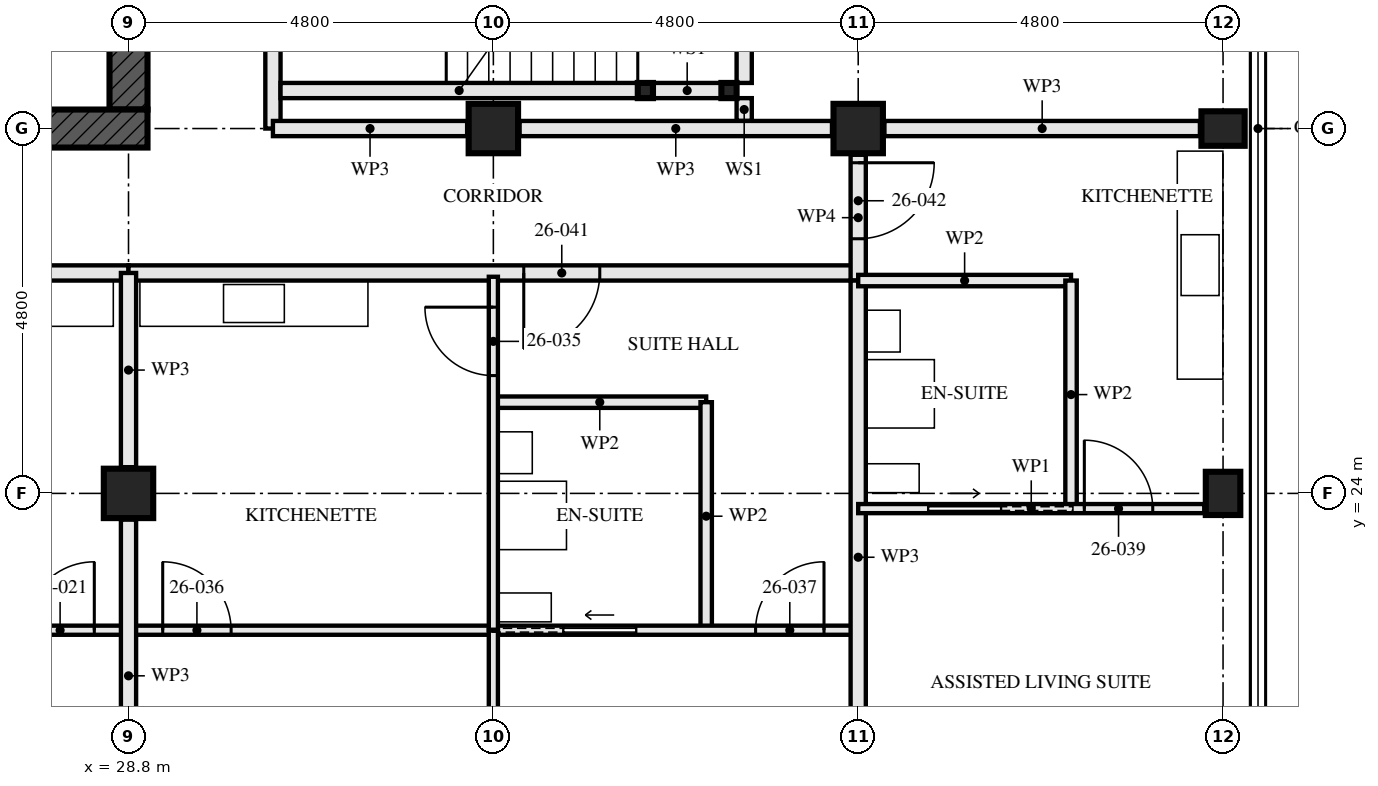
"""IFC4 building model, lengths in metres.
Left out: names, types, materials, properties, quantities, classifications, styles, units other than length and angle.
Written with IfcOpenShell. Run it as: python <this file> out.ifc"""

import sys

from ifc_helpers import new_model, si_unit, direction, frame, frame_2d, origin, origin_2d, place, context, subcontext, project, spatial, rectangle, hollow_rectangle, i_section, extrude, element, fill, save


model = new_model("IFC4")
c1 = context("Model", 3, precision=1e-05, world=origin(), true_north=direction((0.0, 1.0)))
c2 = subcontext(c1, "Body", "Model", "MODEL_VIEW")
j1 = project(units=[si_unit("LENGTHUNIT", "METRE"), si_unit("PLANEANGLEUNIT", "RADIAN")], contexts=[c1])
p1 = place(None, origin())
s1 = spatial("IfcSite", under=j1, at=p1, CompositionType="ELEMENT")
p2 = place(p1, origin())
s2 = spatial("IfcBuilding", under=s1, at=p2, CompositionType="ELEMENT")
p3 = place(p2, frame((0.0, 0.0, 98.0)))
s3 = spatial("IfcBuildingStorey", under=s2, at=p3, CompositionType="ELEMENT", Elevation=98.0)
for number, where, z_axis, x_axis in (
    (1, (28.8, 24.0, 0.0), (0.0, 0.0, 1.0), (1.0, 0.0, 0.0)),
    (2, (33.6, 28.8, 0.0), (0.0, 0.0, 1.0), (0.0, 1.0, 0.0)),
    (3, (38.4, 28.8, 0.0), (0.0, 0.0, 1.0), (0.0, 1.0, 0.0)),
):
    element("IfcColumn", number, at=place(p3, frame(where, z_axis=z_axis, x_axis=x_axis)), inside=s3, PredefinedType="COLUMN", context=c2, shape_type="SweptSolid", body=[
        extrude(hollow_rectangle(XDim=0.65, YDim=0.65, WallThickness=0.05, at=origin_2d()), origin(), (0.0, 0.0, 1.0), 3.5),
    ])
for number, where, z_axis, x_axis in (
    (4, (43.2, 24.0, 0.0), (0.0, 0.0, 1.0), (1.0, 0.0, 0.0)),
    (5, (43.2, 28.8, 0.0), (0.0, 0.0, 1.0), (0.0, 1.0, 0.0)),
):
    element("IfcColumn", number, at=place(p3, frame(where, z_axis=z_axis, x_axis=x_axis)), inside=s3, PredefinedType="COLUMN", context=c2, shape_type="SweptSolid", body=[
        extrude(i_section(OverallWidth=0.454, OverallDepth=0.569, WebThickness=0.078, FlangeThickness=0.125, FilletRadius=0.015, at=origin_2d()), origin(), (0.0, 0.0, 1.0), 3.5),
    ])
p4 = place(p3, frame((14.15, 28.8, -0.17), z_axis=(0.0, 0.0, 1.0), x_axis=(1.0, 0.0, 0.0)))
e6 = element("IfcWall", 6, at=p4, inside=s3, PredefinedType="SHEAR", context=c2, shape_type="SweptSolid", body=[
    extrude(rectangle(XDim=14.9, YDim=0.5, at=frame_2d((7.45, 0.0))), origin(), (0.0, 0.0, 1.0), 3.5),
])
p5 = place(p4, frame((6.85, 0.0, 0.17)))
e7 = element("IfcOpeningElement", 7, at=p5, cuts=e6, PredefinedType="OPENING", context=c2, shape_type="SweptSolid", body=[
    extrude(rectangle(XDim=1.2, YDim=2.1, at=frame_2d((0.6, 1.05))), frame((0.0, 0.26, 0.0), z_axis=(0.0, -1.0, 0.0), x_axis=(1.0, 0.0, 0.0)), (0.0, 0.0, 1.0), 0.521),
])
p6 = place(p3, frame((28.8, 29.05, -0.17), z_axis=(0.0, 0.0, 1.0), x_axis=(0.0, 1.0, 0.0)))
e8 = element("IfcWall", 8, at=p6, inside=s3, PredefinedType="SHEAR", context=c2, shape_type="SweptSolid", body=[
    extrude(rectangle(XDim=13.9, YDim=0.5, at=frame_2d((6.95, 0.0))), origin(), (0.0, 0.0, 1.0), 3.5),
])
p7 = place(p6, frame((6.35, 0.0, 0.17)))
e9 = element("IfcOpeningElement", 9, at=p7, cuts=e8, PredefinedType="OPENING", context=c2, shape_type="SweptSolid", body=[
    extrude(rectangle(XDim=1.2, YDim=2.1, at=frame_2d((0.6, 1.05))), frame((0.0, 0.26, 0.0), z_axis=(0.0, -1.0, 0.0), x_axis=(1.0, 0.0, 0.0)), (0.0, 0.0, 1.0), 0.521),
])
for number, where, z_axis, x_axis in (
    (10, (36.7, 29.3, 0.0), (0.0, 0.0, 1.0), (1.0, 0.0, 0.0)),
    (11, (35.6, 29.3, 0.0), (0.0, 0.0, 1.0), (1.0, 0.0, 0.0)),
):
    element("IfcColumn", number, at=place(p3, frame(where, z_axis=z_axis, x_axis=x_axis)), inside=s3, PredefinedType="COLUMN", context=c2, shape_type="SweptSolid", body=[
        extrude(hollow_rectangle(XDim=0.2, YDim=0.2, WallThickness=0.008, at=origin_2d()), origin(), (0.0, 0.0, 1.0), 3.33),
    ])
p8 = place(p3, frame((24.0, 22.2, 0.0), z_axis=(0.0, 0.0, 1.0), x_axis=(1.0, 0.0, 0.0)))
e12 = element("IfcWall", 12, at=p8, inside=s3, PredefinedType="PARTITIONING", context=c2, shape_type="SweptSolid", body=[
    extrude(rectangle(XDim=4.8, YDim=0.12, at=frame_2d((2.4, 0.0))), origin(), (0.0, 0.0, 1.0), 3.33),
])
p9 = place(p8, frame((3.45, 0.0, 0.0)))
e13 = element("IfcOpeningElement", 13, at=p9, cuts=e12, PredefinedType="OPENING", context=c2, shape_type="SweptSolid", body=[
    extrude(rectangle(XDim=0.9, YDim=2.1, at=frame_2d((0.45, 1.05))), frame((0.0, 0.071, 0.0), z_axis=(0.0, -1.0, 0.0), x_axis=(1.0, 0.0, 0.0)), (0.0, 0.0, 1.0), 0.141),
])
p10 = place(p8, frame((0.925, 0.0, 0.0)))
e14 = element("IfcOpeningElement", 14, at=p10, cuts=e12, PredefinedType="OPENING", context=c2, shape_type="SweptSolid", body=[
    extrude(rectangle(XDim=0.95, YDim=2.1, at=frame_2d((0.475, 1.05))), frame((0.0, 0.071, 0.0), z_axis=(0.0, -1.0, 0.0), x_axis=(1.0, 0.0, 0.0)), (0.0, 0.0, 1.0), 0.141),
])
p11 = place(p3, frame((13.96, 26.9, 0.0), z_axis=(0.0, 0.0, 1.0), x_axis=(1.0, 0.0, 0.0)))
e15 = element("IfcWall", 15, at=p11, inside=s3, PredefinedType="PARTITIONING", context=c2, shape_type="SweptSolid", body=[
    extrude(rectangle(XDim=14.84, YDim=0.2, at=frame_2d((7.42, 0.0))), origin(), (0.0, 0.0, 1.0), 2.32),
])
p12 = place(p11, frame((1.84, 0.0, 0.0)))
e16 = element("IfcOpeningElement", 16, at=p12, cuts=e15, PredefinedType="OPENING", context=c2, shape_type="SweptSolid", body=[
    extrude(rectangle(XDim=1.0, YDim=2.1, at=frame_2d((0.5, 1.05))), frame((0.0, 0.111, 0.0), z_axis=(0.0, -1.0, 0.0), x_axis=(1.0, 0.0, 0.0)), (0.0, 0.0, 1.0), 0.221),
])
p13 = place(p11, frame((3.94, 0.0, 0.0)))
e17 = element("IfcOpeningElement", 17, at=p13, cuts=e15, PredefinedType="OPENING", context=c2, shape_type="SweptSolid", body=[
    extrude(rectangle(XDim=1.0, YDim=2.1, at=frame_2d((0.5, 1.05))), frame((0.0, 0.111, 0.0), z_axis=(0.0, -1.0, 0.0), x_axis=(1.0, 0.0, 0.0)), (0.0, 0.0, 1.0), 0.221),
])
p14 = place(p11, frame((10.44, 0.0, 0.0)))
e18 = element("IfcOpeningElement", 18, at=p14, cuts=e15, PredefinedType="OPENING", context=c2, shape_type="SweptSolid", body=[
    extrude(rectangle(XDim=1.0, YDim=2.1, at=frame_2d((0.5, 1.05))), frame((0.0, 0.111, 0.0), z_axis=(0.0, -1.0, 0.0), x_axis=(1.0, 0.0, 0.0)), (0.0, 0.0, 1.0), 0.221),
])
p15 = place(p3, frame((36.4, 22.2, 0.0), z_axis=(0.0, 0.0, 1.0), x_axis=(0.0, 1.0, 0.0)))
e19 = element("IfcWall", 19, at=p15, inside=s3, PredefinedType="PARTITIONING", context=c2, shape_type="SweptSolid", body=[
    extrude(rectangle(XDim=3.0, YDim=0.15, at=frame_2d((1.5, 0.0))), origin(), (0.0, 0.0, 1.0), 2.55),
])
p16 = place(p3, frame((33.6, 25.2, 0.0), z_axis=(0.0, 0.0, 1.0), x_axis=(1.0, 0.0, 0.0)))
e20 = element("IfcWall", 20, at=p16, inside=s3, PredefinedType="PARTITIONING", context=c2, shape_type="SweptSolid", body=[
    extrude(rectangle(XDim=2.8, YDim=0.15, at=frame_2d((1.4, 0.0))), origin(), (0.0, 0.0, 1.0), 3.33),
])
p17 = place(p3, frame((33.6, 22.2, 0.0), z_axis=(0.0, 0.0, 1.0), x_axis=(0.0, 1.0, 0.0)))
e21 = element("IfcWall", 21, at=p17, inside=s3, PredefinedType="PARTITIONING", context=c2, shape_type="SweptSolid", body=[
    extrude(rectangle(XDim=4.65, YDim=0.12, at=frame_2d((2.325, 0.0))), origin(), (0.0, 0.0, 1.0), 2.55),
])
p18 = place(p17, frame((3.35, 0.0, 0.0)))
e22 = element("IfcOpeningElement", 22, at=p18, cuts=e21, PredefinedType="OPENING", context=c2, shape_type="SweptSolid", body=[
    extrude(rectangle(XDim=0.9, YDim=2.1, at=frame_2d((0.45, 1.05))), frame((0.0, 0.071, 0.0), z_axis=(0.0, -1.0, 0.0), x_axis=(1.0, 0.0, 0.0)), (0.0, 0.0, 1.0), 0.141),
])
p19 = place(p3, frame((28.8, 22.2, 0.0), z_axis=(0.0, 0.0, 1.0), x_axis=(1.0, 0.0, 0.0)))
e23 = element("IfcWall", 23, at=p19, inside=s3, PredefinedType="PARTITIONING", context=c2, shape_type="SweptSolid", body=[
    extrude(rectangle(XDim=4.8, YDim=0.12, at=frame_2d((2.4, 0.0))), origin(), (0.0, 0.0, 1.0), 3.33),
])
p20 = place(p19, frame((0.45, 0.0, 0.0)))
e24 = element("IfcOpeningElement", 24, at=p20, cuts=e23, PredefinedType="OPENING", context=c2, shape_type="SweptSolid", body=[
    extrude(rectangle(XDim=0.9, YDim=2.1, at=frame_2d((0.45, 1.05))), frame((0.0, 0.071, 0.0), z_axis=(0.0, -1.0, 0.0), x_axis=(1.0, 0.0, 0.0)), (0.0, 0.0, 1.0), 0.141),
])
p21 = place(p3, frame((33.6, 22.2, 0.0), z_axis=(0.0, 0.0, 1.0), x_axis=(1.0, 0.0, 0.0)))
e25 = element("IfcWall", 25, at=p21, inside=s3, PredefinedType="PARTITIONING", context=c2, shape_type="SweptSolid", body=[
    extrude(rectangle(XDim=4.8, YDim=0.12, at=frame_2d((2.4, 0.0))), origin(), (0.0, 0.0, 1.0), 3.33),
])
p22 = place(p21, frame((3.45, 0.0, 0.0)))
e26 = element("IfcOpeningElement", 26, at=p22, cuts=e25, PredefinedType="OPENING", context=c2, shape_type="SweptSolid", body=[
    extrude(rectangle(XDim=0.9, YDim=2.1, at=frame_2d((0.45, 1.05))), frame((0.0, 0.071, 0.0), z_axis=(0.0, -1.0, 0.0), x_axis=(1.0, 0.0, 0.0)), (0.0, 0.0, 1.0), 0.141),
])
p23 = place(p21, frame((0.925, 0.0, 0.0)))
e27 = element("IfcOpeningElement", 27, at=p23, cuts=e25, PredefinedType="OPENING", context=c2, shape_type="SweptSolid", body=[
    extrude(rectangle(XDim=0.95, YDim=2.1, at=frame_2d((0.475, 1.05))), frame((0.0, 0.071, 0.0), z_axis=(0.0, -1.0, 0.0), x_axis=(1.0, 0.0, 0.0)), (0.0, 0.0, 1.0), 0.141),
])
p24 = place(p3, frame((33.6, 14.647, 0.0), z_axis=(0.0, 0.0, 1.0), x_axis=(0.0, 1.0, 0.0)))
e28 = element("IfcWall", 28, at=p24, inside=s3, PredefinedType="PARTITIONING", context=c2, shape_type="SweptSolid", body=[
    extrude(rectangle(XDim=7.553, YDim=0.12, at=frame_2d((3.776, 0.0))), origin(), (0.0, 0.0, 1.0), 2.55),
])
p25 = place(p3, frame((38.4, 19.52, 0.0), z_axis=(0.0, 0.0, 1.0), x_axis=(0.0, 1.0, 0.0)))
e29 = element("IfcWall", 29, at=p25, inside=s3, PredefinedType="PARTITIONING", context=c2, shape_type="SweptSolid", body=[
    extrude(rectangle(XDim=7.28, YDim=0.2, at=frame_2d((3.64, 0.0))), origin(), (0.0, 0.0, 1.0), 2.55),
])
p26 = place(p3, frame((41.2, 23.8, 0.0), z_axis=(0.0, 0.0, 1.0), x_axis=(0.0, 1.0, 0.0)))
e30 = element("IfcWall", 30, at=p26, inside=s3, PredefinedType="PARTITIONING", context=c2, shape_type="SweptSolid", body=[
    extrude(rectangle(XDim=3.0, YDim=0.15, at=frame_2d((1.5, 0.0))), origin(), (0.0, 0.0, 1.0), 2.55),
])
p27 = place(p3, frame((38.4, 26.8, 0.0), z_axis=(0.0, 0.0, 1.0), x_axis=(1.0, 0.0, 0.0)))
e31 = element("IfcWall", 31, at=p27, inside=s3, PredefinedType="PARTITIONING", context=c2, shape_type="SweptSolid", body=[
    extrude(rectangle(XDim=2.8, YDim=0.15, at=frame_2d((1.4, 0.0))), origin(), (0.0, 0.0, 1.0), 3.33),
])
p28 = place(p3, frame((38.4, 23.8, 0.0), z_axis=(0.0, 0.0, 1.0), x_axis=(1.0, 0.0, 0.0)))
e32 = element("IfcWall", 32, at=p28, inside=s3, PredefinedType="PARTITIONING", context=c2, shape_type="SweptSolid", body=[
    extrude(rectangle(XDim=4.553, YDim=0.12, at=frame_2d((2.276, 0.0))), origin(), (0.0, 0.0, 1.0), 3.33),
])
p29 = place(p28, frame((2.975, 0.0, 0.0)))
e33 = element("IfcOpeningElement", 33, at=p29, cuts=e32, PredefinedType="OPENING", context=c2, shape_type="SweptSolid", body=[
    extrude(rectangle(XDim=0.9, YDim=2.1, at=frame_2d((0.45, 1.05))), frame((0.0, 0.071, 0.0), z_axis=(0.0, -1.0, 0.0), x_axis=(1.0, 0.0, 0.0)), (0.0, 0.0, 1.0), 0.141),
])
p30 = place(p28, frame((0.925, 0.0, 0.0)))
e34 = element("IfcOpeningElement", 34, at=p30, cuts=e32, PredefinedType="OPENING", context=c2, shape_type="SweptSolid", body=[
    extrude(rectangle(XDim=0.95, YDim=2.1, at=frame_2d((0.475, 1.05))), frame((0.0, 0.071, 0.0), z_axis=(0.0, -1.0, 0.0), x_axis=(1.0, 0.0, 0.0)), (0.0, 0.0, 1.0), 0.141),
])
p31 = place(p3, frame((28.8, 26.9, 0.0), z_axis=(0.0, 0.0, 1.0), x_axis=(1.0, 0.0, 0.0)))
e35 = element("IfcWall", 35, at=p31, inside=s3, PredefinedType="PARTITIONING", context=c2, shape_type="SweptSolid", body=[
    extrude(rectangle(XDim=9.6, YDim=0.2, at=frame_2d((4.8, 0.0))), origin(), (0.0, 0.0, 1.0), 3.33),
])
p32 = place(p31, frame((5.2, 0.0, 0.0)))
e36 = element("IfcOpeningElement", 36, at=p32, cuts=e35, PredefinedType="OPENING", context=c2, shape_type="SweptSolid", body=[
    extrude(rectangle(XDim=1.0, YDim=2.1, at=frame_2d((0.5, 1.05))), frame((0.0, 0.111, 0.0), z_axis=(0.0, -1.0, 0.0), x_axis=(1.0, 0.0, 0.0)), (0.0, 0.0, 1.0), 0.221),
])
p33 = place(p3, frame((38.4, 26.8, 0.0), z_axis=(0.0, 0.0, 1.0), x_axis=(0.0, 1.0, 0.0)))
e37 = element("IfcWall", 37, at=p33, inside=s3, PredefinedType="PARTITIONING", context=c2, shape_type="SweptSolid", body=[
    extrude(rectangle(XDim=1.655, YDim=0.2, at=frame_2d((0.828, 0.0))), origin(), (0.0, 0.0, 1.0), 3.33),
])
p34 = place(p33, frame((0.55, 0.0, 0.0)))
e38 = element("IfcOpeningElement", 38, at=p34, cuts=e37, PredefinedType="OPENING", context=c2, shape_type="SweptSolid", body=[
    extrude(rectangle(XDim=1.0, YDim=2.1, at=frame_2d((0.5, 1.05))), frame((0.0, 0.111, 0.0), z_axis=(0.0, -1.0, 0.0), x_axis=(1.0, 0.0, 0.0)), (0.0, 0.0, 1.0), 0.221),
])
p35 = place(p3, frame((36.6, 29.3, 0.0), z_axis=(0.0, 0.0, 1.0), x_axis=(-1.0, 0.0, 0.0)))
e39 = element("IfcWall", 39, at=p35, inside=s3, PredefinedType="SOLIDWALL", context=c2, shape_type="SweptSolid", body=[
    extrude(rectangle(XDim=0.9, YDim=0.2, at=frame_2d((0.45, 0.0))), origin(), (0.0, 0.0, 1.0), 2.99),
])
p36 = place(p3, frame((35.5, 29.3, 0.0), z_axis=(0.0, 0.0, 1.0), x_axis=(-1.0, 0.0, 0.0)))
e40 = element("IfcWall", 40, at=p36, inside=s3, PredefinedType="SOLIDWALL", context=c2, shape_type="SweptSolid", body=[
    extrude(rectangle(XDim=4.7, YDim=0.2, at=frame_2d((2.35, 0.0))), origin(), (0.0, 0.0, 1.0), 2.99),
])
p37 = place(p3, frame((36.9, 28.9, 0.0), z_axis=(0.0, 0.0, 1.0), x_axis=(0.0, 1.0, 0.0)))
e41 = element("IfcWall", 41, at=p37, inside=s3, PredefinedType="SOLIDWALL", context=c2, shape_type="SweptSolid", body=[
    extrude(rectangle(XDim=0.3, YDim=0.2, at=frame_2d((0.15, 0.0))), origin(), (0.0, 0.0, 1.0), 3.33),
])
p38 = place(p3, frame((36.9, 29.4, 0.0), z_axis=(0.0, 0.0, 1.0), x_axis=(0.0, 1.0, 0.0)))
e42 = element("IfcWall", 42, at=p38, inside=s3, PredefinedType="SOLIDWALL", context=c2, shape_type="SweptSolid", body=[
    extrude(rectangle(XDim=2.6, YDim=0.2, at=frame_2d((1.3, 0.0))), origin(), (0.0, 0.0, 1.0), 3.33),
])
p39 = place(p3, frame((30.7, 28.8, 0.0), z_axis=(0.0, 0.0, 1.0), x_axis=(0.0, 1.0, 0.0)))
e43 = element("IfcWall", 43, at=p39, inside=s3, PredefinedType="PARTITIONING", context=c2, shape_type="SweptSolid", body=[
    extrude(rectangle(XDim=14.84, YDim=0.2, at=frame_2d((7.42, 0.0))), origin(), (0.0, 0.0, 1.0), 2.32),
])
p40 = place(p39, frame((1.4, 0.0, 0.0)))
e44 = element("IfcOpeningElement", 44, at=p40, cuts=e43, PredefinedType="OPENING", context=c2, shape_type="SweptSolid", body=[
    extrude(rectangle(XDim=1.0, YDim=2.1, at=frame_2d((0.5, 1.05))), frame((0.0, 0.111, 0.0), z_axis=(0.0, -1.0, 0.0), x_axis=(1.0, 0.0, 0.0)), (0.0, 0.0, 1.0), 0.221),
])
p41 = place(p39, frame((4.1, 0.0, 0.0)))
e45 = element("IfcOpeningElement", 45, at=p41, cuts=e43, PredefinedType="OPENING", context=c2, shape_type="SweptSolid", body=[
    extrude(rectangle(XDim=1.0, YDim=2.1, at=frame_2d((0.5, 1.05))), frame((0.0, 0.111, 0.0), z_axis=(0.0, -1.0, 0.0), x_axis=(1.0, 0.0, 0.0)), (0.0, 0.0, 1.0), 0.221),
])
p42 = place(p39, frame((5.975, 0.0, 0.0)))
e46 = element("IfcOpeningElement", 46, at=p42, cuts=e43, PredefinedType="OPENING", context=c2, shape_type="SweptSolid", body=[
    extrude(rectangle(XDim=1.0, YDim=2.1, at=frame_2d((0.5, 1.05))), frame((0.0, 0.111, 0.0), z_axis=(0.0, -1.0, 0.0), x_axis=(1.0, 0.0, 0.0)), (0.0, 0.0, 1.0), 0.221),
])
p43 = place(p39, frame((13.0, 0.0, 0.0)))
e47 = element("IfcOpeningElement", 47, at=p43, cuts=e43, PredefinedType="OPENING", context=c2, shape_type="SweptSolid", body=[
    extrude(rectangle(XDim=1.0, YDim=2.1, at=frame_2d((0.5, 1.05))), frame((0.0, 0.111, 0.0), z_axis=(0.0, -1.0, 0.0), x_axis=(1.0, 0.0, 0.0)), (0.0, 0.0, 1.0), 0.221),
])
p44 = place(p3, frame((28.8, 19.545, 0.0), z_axis=(0.0, 0.0, 1.0), x_axis=(0.0, 1.0, 0.0)))
e48 = element("IfcWall", 48, at=p44, inside=s3, PredefinedType="PARTITIONING", context=c2, shape_type="SweptSolid", body=[
    extrude(rectangle(XDim=4.11, YDim=0.2, at=frame_2d((2.055, 0.0))), origin(), (0.0, 0.0, 1.0), 2.32),
])
p45 = place(p3, frame((28.8, 24.345, 0.0), z_axis=(0.0, 0.0, 1.0), x_axis=(0.0, 1.0, 0.0)))
e49 = element("IfcWall", 49, at=p45, inside=s3, PredefinedType="PARTITIONING", context=c2, shape_type="SweptSolid", body=[
    extrude(rectangle(XDim=2.555, YDim=0.2, at=frame_2d((1.277, 0.0))), origin(), (0.0, 0.0, 1.0), 2.32),
])
p46 = place(p3, frame((42.896, 28.8, 0.0), z_axis=(0.0, 0.0, 1.0), x_axis=(-1.0, 0.0, 0.0)))
e50 = element("IfcWall", 50, at=p46, inside=s3, PredefinedType="PARTITIONING", context=c2, shape_type="SweptSolid", body=[
    extrude(rectangle(XDim=4.15, YDim=0.2, at=frame_2d((2.075, 0.0))), origin(), (0.0, 0.0, 1.0), 2.32),
])
p47 = place(p3, frame((38.055, 28.8, 0.0), z_axis=(0.0, 0.0, 1.0), x_axis=(-1.0, 0.0, 0.0)))
e51 = element("IfcWall", 51, at=p47, inside=s3, PredefinedType="PARTITIONING", context=c2, shape_type="SweptSolid", body=[
    extrude(rectangle(XDim=4.11, YDim=0.2, at=frame_2d((2.055, 0.0))), origin(), (0.0, 0.0, 1.0), 2.32),
])
p48 = place(p3, frame((33.255, 28.8, 0.0), z_axis=(0.0, 0.0, 1.0), x_axis=(-1.0, 0.0, 0.0)))
e52 = element("IfcWall", 52, at=p48, inside=s3, PredefinedType="PARTITIONING", context=c2, shape_type="SweptSolid", body=[
    extrude(rectangle(XDim=2.555, YDim=0.2, at=frame_2d((1.277, 0.0))), origin(), (0.0, 0.0, 1.0), 2.32),
])
p49 = place(p9, origin())
e53 = element("IfcDoor", 53, at=p49, inside=s3, OperationType="SINGLE_SWING_LEFT", PredefinedType="DOOR", context=c2, shape_type="SweptSolid", body=[
    extrude(rectangle(XDim=0.9, YDim=2.1, at=frame_2d((0.45, 1.05))), frame((0.0, 0.022, 0.0), z_axis=(0.0, -1.0, 0.0), x_axis=(1.0, 0.0, 0.0)), (0.0, 0.0, 1.0), 0.044),
])
fill(e13, e53)
p50 = place(p18, origin())
e54 = element("IfcDoor", 54, at=p50, inside=s3, OperationType="SINGLE_SWING_LEFT", PredefinedType="DOOR", context=c2, shape_type="SweptSolid", body=[
    extrude(rectangle(XDim=0.9, YDim=2.1, at=frame_2d((0.45, 1.05))), frame((0.0, 0.022, 0.0), z_axis=(0.0, -1.0, 0.0), x_axis=(1.0, 0.0, 0.0)), (0.0, 0.0, 1.0), 0.044),
])
fill(e22, e54)
p51 = place(p20, origin())
e55 = element("IfcDoor", 55, at=p51, inside=s3, OperationType="SINGLE_SWING_RIGHT", PredefinedType="DOOR", context=c2, shape_type="SweptSolid", body=[
    extrude(rectangle(XDim=0.9, YDim=2.1, at=frame_2d((0.45, 1.05))), frame((0.0, 0.022, 0.0), z_axis=(0.0, -1.0, 0.0), x_axis=(1.0, 0.0, 0.0)), (0.0, 0.0, 1.0), 0.044),
])
fill(e24, e55)
p52 = place(p22, origin())
e56 = element("IfcDoor", 56, at=p52, inside=s3, OperationType="SINGLE_SWING_LEFT", PredefinedType="DOOR", context=c2, shape_type="SweptSolid", body=[
    extrude(rectangle(XDim=0.9, YDim=2.1, at=frame_2d((0.45, 1.05))), frame((0.0, 0.022, 0.0), z_axis=(0.0, -1.0, 0.0), x_axis=(1.0, 0.0, 0.0)), (0.0, 0.0, 1.0), 0.044),
])
fill(e26, e56)
p53 = place(p23, origin())
e57 = element("IfcDoor", 57, at=p53, inside=s3, OperationType="SLIDING_TO_RIGHT", PredefinedType="DOOR", context=c2, shape_type="SweptSolid", body=[
    extrude(rectangle(XDim=0.95, YDim=2.1, at=frame_2d((0.475, 1.05))), frame((0.0, 0.022, 0.0), z_axis=(0.0, -1.0, 0.0), x_axis=(1.0, 0.0, 0.0)), (0.0, 0.0, 1.0), 0.044),
])
fill(e27, e57)
p54 = place(p29, origin())
e58 = element("IfcDoor", 58, at=p54, inside=s3, OperationType="SINGLE_SWING_RIGHT", PredefinedType="DOOR", context=c2, shape_type="SweptSolid", body=[
    extrude(rectangle(XDim=0.9, YDim=2.1, at=frame_2d((0.45, 1.05))), frame((0.0, 0.022, 0.0), z_axis=(0.0, -1.0, 0.0), x_axis=(1.0, 0.0, 0.0)), (0.0, 0.0, 1.0), 0.044),
])
fill(e33, e58)
p55 = place(p30, origin())
e59 = element("IfcDoor", 59, at=p55, inside=s3, OperationType="SLIDING_TO_LEFT", PredefinedType="DOOR", context=c2, shape_type="SweptSolid", body=[
    extrude(rectangle(XDim=0.95, YDim=2.1, at=frame_2d((0.475, 1.05))), frame((0.0, 0.022, 0.0), z_axis=(0.0, -1.0, 0.0), x_axis=(1.0, 0.0, 0.0)), (0.0, 0.0, 1.0), 0.044),
])
fill(e34, e59)
p56 = place(p32, frame((1.0, 0.0, 0.0), z_axis=(0.0, 0.0, 1.0), x_axis=(-1.0, 0.0, 0.0)))
e60 = element("IfcDoor", 60, at=p56, inside=s3, OperationType="SINGLE_SWING_LEFT", PredefinedType="DOOR", context=c2, shape_type="SweptSolid", body=[
    extrude(rectangle(XDim=1.0, YDim=2.1, at=frame_2d((0.5, 1.05))), frame((0.0, 0.027, 0.0), z_axis=(0.0, -1.0, 0.0), x_axis=(1.0, 0.0, 0.0)), (0.0, 0.0, 1.0), 0.054),
])
fill(e36, e60)
p57 = place(p34, frame((1.0, 0.0, 0.0), z_axis=(0.0, 0.0, 1.0), x_axis=(-1.0, 0.0, 0.0)))
e61 = element("IfcDoor", 61, at=p57, inside=s3, OperationType="SINGLE_SWING_RIGHT", PredefinedType="DOOR", context=c2, shape_type="SweptSolid", body=[
    extrude(rectangle(XDim=1.0, YDim=2.1, at=frame_2d((0.5, 1.05))), frame((0.0, 0.027, 0.0), z_axis=(0.0, -1.0, 0.0), x_axis=(1.0, 0.0, 0.0)), (0.0, 0.0, 1.0), 0.054),
])
fill(e38, e61)
save(model, sys.argv[1])
